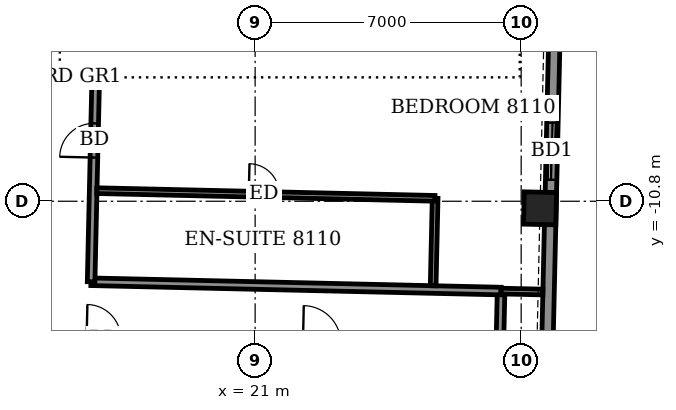
"""IFC4 building model, lengths in metres.
Left out: names, types, materials, properties, quantities, classifications, styles, units other than length and angle.
Written with IfcOpenShell. Run it as: python <this file> out.ifc"""

import sys

from ifc_helpers import new_model, si_unit, direction, frame, frame_2d, origin, origin_2d, place, context, subcontext, project, spatial, rectangle, extrude, element, fill, save


model = new_model("IFC4")
c1 = context("Model", 3, precision=1e-05, world=origin(), true_north=direction((0.0, 1.0)))
c2 = subcontext(c1, "Body", "Model", "MODEL_VIEW")
j1 = project(units=[si_unit("LENGTHUNIT", "METRE"), si_unit("PLANEANGLEUNIT", "RADIAN")], contexts=[c1])
p1 = place(None, origin())
s1 = spatial("IfcSite", under=j1, at=p1, CompositionType="ELEMENT")
p2 = place(p1, origin())
s2 = spatial("IfcBuilding", under=s1, at=p2, CompositionType="ELEMENT")
p3 = place(p2, frame((0.0, 0.0, 316.9)))
s3 = spatial("IfcBuildingStorey", under=s2, at=p3, CompositionType="ELEMENT", Elevation=316.9)
p4 = place(p3, frame((28.496, -10.986, -0.55), z_axis=(0.0, 0.0, 1.0), x_axis=(0.022660985877, 0.999743206888, 0.0)))
e1 = element("IfcColumn", 1, at=p4, inside=s3, PredefinedType="COLUMN", context=c2, shape_type="SweptSolid", body=[
    extrude(rectangle(XDim=0.85, YDim=0.85, at=origin_2d()), origin(), (0.0, 0.0, 1.0), 3.6),
])
p5 = place(p3, frame((28.544, -20.99, 0.0), z_axis=(0.0, 0.0, 1.0), x_axis=(0.02271281838, 0.999742030667, 0.0)))
e2 = element("IfcWall", 2, at=p5, inside=s3, PredefinedType="SOLIDWALL", context=c2, shape_type="SweptSolid", body=[
    extrude(rectangle(XDim=15.5, YDim=0.3, at=frame_2d((7.75, 0.0))), origin(), (0.0, 0.0, 1.0), 2.55),
])
p6 = place(p5, frame((1.88, 0.0, 0.0)))
e3 = element("IfcOpeningElement", 3, at=p6, cuts=e2, PredefinedType="OPENING", context=c2, shape_type="SweptSolid", body=[
    extrude(rectangle(XDim=1.5, YDim=2.4, at=frame_2d((0.75, 1.2))), frame((0.0, 0.16, 0.0), z_axis=(0.0, -1.0, 0.0), x_axis=(1.0, 0.0, 0.0)), (0.0, 0.0, 1.0), 0.32),
])
p7 = place(p5, frame((10.758, 0.0, 0.0)))
e4 = element("IfcOpeningElement", 4, at=p7, cuts=e2, PredefinedType="OPENING", context=c2, shape_type="SweptSolid", body=[
    extrude(rectangle(XDim=1.5, YDim=2.4, at=frame_2d((0.75, 1.2))), frame((0.0, 0.16, 0.0), z_axis=(0.0, -1.0, 0.0), x_axis=(1.0, 0.0, 0.0)), (0.0, 0.0, 1.0), 0.32),
])
p8 = place(p3, frame((-31.347, -13.329, 0.0), z_axis=(0.0, 0.0, 1.0), x_axis=(0.999742613079, -0.022687168058, 0.0)))
e5 = element("IfcWall", 5, at=p8, inside=s3, PredefinedType="PARTITIONING", context=c2, shape_type="SweptSolid", body=[
    extrude(rectangle(XDim=58.799, YDim=0.2, at=frame_2d((29.399, 0.0))), origin(), (0.0, 0.0, 1.0), 3.05),
])
p9 = place(p8, frame((2.075, 0.0, 0.0)))
e6 = element("IfcOpeningElement", 6, at=p9, cuts=e5, PredefinedType="OPENING", context=c2, shape_type="SweptSolid", body=[
    extrude(rectangle(XDim=1.0, YDim=2.1, at=frame_2d((0.5, 1.05))), frame((0.0, 0.11, 0.0), z_axis=(0.0, -1.0, 0.0), x_axis=(1.0, 0.0, 0.0)), (0.0, 0.0, 1.0), 0.22),
])
p10 = place(p8, frame((7.5, 0.0, 0.0)))
e7 = element("IfcOpeningElement", 7, at=p10, cuts=e5, PredefinedType="OPENING", context=c2, shape_type="SweptSolid", body=[
    extrude(rectangle(XDim=0.9, YDim=2.1, at=frame_2d((0.45, 1.05))), frame((0.0, 0.11, 0.0), z_axis=(0.0, -1.0, 0.0), x_axis=(1.0, 0.0, 0.0)), (0.0, 0.0, 1.0), 0.22),
])
p11 = place(p8, frame((12.35, 0.0, 0.0)))
e8 = element("IfcOpeningElement", 8, at=p11, cuts=e5, PredefinedType="OPENING", context=c2, shape_type="SweptSolid", body=[
    extrude(rectangle(XDim=0.9, YDim=2.1, at=frame_2d((0.45, 1.05))), frame((0.0, 0.11, 0.0), z_axis=(0.0, -1.0, 0.0), x_axis=(1.0, 0.0, 0.0)), (0.0, 0.0, 1.0), 0.22),
])
p12 = place(p8, frame((14.425, 0.0, 0.0)))
e9 = element("IfcOpeningElement", 9, at=p12, cuts=e5, PredefinedType="OPENING", context=c2, shape_type="SweptSolid", body=[
    extrude(rectangle(XDim=0.9, YDim=2.1, at=frame_2d((0.45, 1.05))), frame((0.0, 0.11, 0.0), z_axis=(0.0, -1.0, 0.0), x_axis=(1.0, 0.0, 0.0)), (0.0, 0.0, 1.0), 0.22),
])
p13 = place(p8, frame((21.225, 0.0, 0.0)))
e10 = element("IfcOpeningElement", 10, at=p13, cuts=e5, PredefinedType="OPENING", context=c2, shape_type="SweptSolid", body=[
    extrude(rectangle(XDim=0.9, YDim=2.1, at=frame_2d((0.45, 1.05))), frame((0.0, 0.11, 0.0), z_axis=(0.0, -1.0, 0.0), x_axis=(1.0, 0.0, 0.0)), (0.0, 0.0, 1.0), 0.22),
])
p14 = place(p8, frame((23.25, 0.0, 0.0)))
e11 = element("IfcOpeningElement", 11, at=p14, cuts=e5, PredefinedType="OPENING", context=c2, shape_type="SweptSolid", body=[
    extrude(rectangle(XDim=0.9, YDim=2.1, at=frame_2d((0.45, 1.05))), frame((0.0, 0.11, 0.0), z_axis=(0.0, -1.0, 0.0), x_axis=(1.0, 0.0, 0.0)), (0.0, 0.0, 1.0), 0.22),
])
p15 = place(p8, frame((30.025, 0.0, 0.0)))
e12 = element("IfcOpeningElement", 12, at=p15, cuts=e5, PredefinedType="OPENING", context=c2, shape_type="SweptSolid", body=[
    extrude(rectangle(XDim=0.9, YDim=2.1, at=frame_2d((0.45, 1.05))), frame((0.0, 0.11, 0.0), z_axis=(0.0, -1.0, 0.0), x_axis=(1.0, 0.0, 0.0)), (0.0, 0.0, 1.0), 0.22),
])
p16 = place(p8, frame((32.025, 0.0, 0.0)))
e13 = element("IfcOpeningElement", 13, at=p16, cuts=e5, PredefinedType="OPENING", context=c2, shape_type="SweptSolid", body=[
    extrude(rectangle(XDim=0.9, YDim=2.1, at=frame_2d((0.45, 1.05))), frame((0.0, 0.11, 0.0), z_axis=(0.0, -1.0, 0.0), x_axis=(1.0, 0.0, 0.0)), (0.0, 0.0, 1.0), 0.22),
])
p17 = place(p8, frame((38.95, 0.0, 0.0)))
e14 = element("IfcOpeningElement", 14, at=p17, cuts=e5, PredefinedType="OPENING", context=c2, shape_type="SweptSolid", body=[
    extrude(rectangle(XDim=0.9, YDim=2.1, at=frame_2d((0.45, 1.05))), frame((0.0, 0.11, 0.0), z_axis=(0.0, -1.0, 0.0), x_axis=(1.0, 0.0, 0.0)), (0.0, 0.0, 1.0), 0.22),
])
p18 = place(p8, frame((41.05, 0.0, 0.0)))
e15 = element("IfcOpeningElement", 15, at=p18, cuts=e5, PredefinedType="OPENING", context=c2, shape_type="SweptSolid", body=[
    extrude(rectangle(XDim=0.9, YDim=2.1, at=frame_2d((0.45, 1.05))), frame((0.0, 0.11, 0.0), z_axis=(0.0, -1.0, 0.0), x_axis=(1.0, 0.0, 0.0)), (0.0, 0.0, 1.0), 0.22),
])
p19 = place(p8, frame((47.925, 0.0, 0.0)))
e16 = element("IfcOpeningElement", 16, at=p19, cuts=e5, PredefinedType="OPENING", context=c2, shape_type="SweptSolid", body=[
    extrude(rectangle(XDim=0.9, YDim=2.1, at=frame_2d((0.45, 1.05))), frame((0.0, 0.11, 0.0), z_axis=(0.0, -1.0, 0.0), x_axis=(1.0, 0.0, 0.0)), (0.0, 0.0, 1.0), 0.22),
])
p20 = place(p8, frame((53.618, 0.0, 0.0)))
e17 = element("IfcOpeningElement", 17, at=p20, cuts=e5, PredefinedType="OPENING", context=c2, shape_type="SweptSolid", body=[
    extrude(rectangle(XDim=1.0, YDim=2.1, at=frame_2d((0.5, 1.05))), frame((0.0, 0.11, 0.0), z_axis=(0.0, -1.0, 0.0), x_axis=(1.0, 0.0, 0.0)), (0.0, 0.0, 1.0), 0.22),
])
p21 = place(p3, frame((27.437, -14.663, 0.0), z_axis=(0.0, 0.0, 1.0), x_axis=(0.022617910375, 0.999744182344, 0.0)))
e18 = element("IfcWall", 18, at=p21, inside=s3, PredefinedType="PARTITIONING", context=c2, shape_type="SweptSolid", body=[
    extrude(rectangle(XDim=1.5, YDim=0.2, at=frame_2d((0.75, 0.0))), origin(), (0.0, 0.0, 1.0), 3.05),
])
p22 = place(p3, frame((16.679, -12.918, 0.0), z_axis=(0.0, 0.0, 1.0), x_axis=(0.999742162372, -0.022707020428, 0.0)))
e19 = element("IfcWall", 19, at=p22, inside=s3, PredefinedType="PARTITIONING", context=c2, shape_type="SweptSolid", body=[
    extrude(rectangle(XDim=10.795, YDim=0.2, at=frame_2d((5.397, 0.0))), origin(), (0.0, 0.0, 1.0), 3.05),
])
p23 = place(p3, frame((16.684, -12.919, 0.0), z_axis=(0.0, 0.0, 1.0), x_axis=(0.022667483124, 0.999743059595, 0.0)))
e20 = element("IfcWall", 20, at=p23, inside=s3, PredefinedType="PARTITIONING", context=c2, shape_type="SweptSolid", body=[
    extrude(rectangle(XDim=5.245, YDim=0.2, at=frame_2d((2.623, 0.0))), origin(), (0.0, 0.0, 1.0), 3.05),
])
p24 = place(p23, frame((3.27, 0.0, 0.0)))
e21 = element("IfcOpeningElement", 21, at=p24, cuts=e20, PredefinedType="OPENING", context=c2, shape_type="SweptSolid", body=[
    extrude(rectangle(XDim=0.9, YDim=2.1, at=frame_2d((0.45, 1.05))), frame((0.0, 0.11, 0.0), z_axis=(0.0, -1.0, 0.0), x_axis=(1.0, 0.0, 0.0)), (0.0, 0.0, 1.0), 0.22),
])
p25 = place(p3, frame((25.684, -13.023, 0.0), z_axis=(0.0, 0.0, 1.0), x_axis=(0.022603288534, 0.999744513037, 0.0)))
e22 = element("IfcWall", 22, at=p25, inside=s3, PredefinedType="PARTITIONING", context=c2, shape_type="SweptSolid", body=[
    extrude(rectangle(XDim=2.301, YDim=0.15, at=frame_2d((1.15, 0.0))), origin(), (0.0, 0.0, 1.0), 3.05),
])
p26 = place(p3, frame((27.467, -13.163, 0.0), z_axis=(0.0, 0.0, 1.0), x_axis=(0.999745701647, -0.022550654924, 0.0)))
e23 = element("IfcWall", 23, at=p26, inside=s3, PredefinedType="PARTITIONING", context=c2, shape_type="SweptSolid", body=[
    extrude(rectangle(XDim=1.104, YDim=0.15, at=frame_2d((0.552, 0.0))), origin(), (0.0, 0.0, 1.0), 2.55),
])
p27 = place(p3, frame((16.834, -10.521, 0.0), z_axis=(0.0, 0.0, 1.0), x_axis=(0.999742599783, -0.022687753966, 0.0)))
e24 = element("IfcWall", 24, at=p27, inside=s3, PredefinedType="PARTITIONING", context=c2, shape_type="SweptSolid", body=[
    extrude(rectangle(XDim=8.899, YDim=0.15, at=frame_2d((4.45, 0.0))), origin(), (0.0, 0.0, 1.0), 3.05),
])
p28 = place(p27, frame((4.0, 0.0, 0.0)))
e25 = element("IfcOpeningElement", 25, at=p28, cuts=e24, PredefinedType="OPENING", context=c2, shape_type="SweptSolid", body=[
    extrude(rectangle(XDim=0.8, YDim=2.1, at=frame_2d((0.4, 1.05))), frame((0.0, 0.085, 0.0), z_axis=(0.0, -1.0, 0.0), x_axis=(1.0, 0.0, 0.0)), (0.0, 0.0, 1.0), 0.17),
])
p29 = place(p7, origin())
e26 = element("IfcDoor", 26, at=p29, inside=s3, OperationType="SLIDING_TO_LEFT", PredefinedType="DOOR", context=c2, shape_type="SweptSolid", body=[
    extrude(rectangle(XDim=1.5, YDim=2.4, at=frame_2d((0.75, 1.2))), frame((0.0, 0.025, 0.0), z_axis=(0.0, -1.0, 0.0), x_axis=(1.0, 0.0, 0.0)), (0.0, 0.0, 1.0), 0.05),
])
fill(e4, e26)
p30 = place(p24, origin())
e27 = element("IfcDoor", 27, at=p30, inside=s3, OperationType="SINGLE_SWING_RIGHT", PredefinedType="DOOR", context=c2, shape_type="SweptSolid", body=[
    extrude(rectangle(XDim=0.9, YDim=2.1, at=frame_2d((0.45, 1.05))), frame((0.0, 0.025, 0.0), z_axis=(0.0, -1.0, 0.0), x_axis=(1.0, 0.0, 0.0)), (0.0, 0.0, 1.0), 0.05),
])
fill(e21, e27)
p31 = place(p28, origin())
e28 = element("IfcDoor", 28, at=p31, inside=s3, OperationType="SINGLE_SWING_RIGHT", PredefinedType="DOOR", context=c2, shape_type="SweptSolid", body=[
    extrude(rectangle(XDim=0.8, YDim=2.1, at=frame_2d((0.4, 1.05))), frame((0.0, 0.025, 0.0), z_axis=(0.0, -1.0, 0.0), x_axis=(1.0, 0.0, 0.0)), (0.0, 0.0, 1.0), 0.05),
])
fill(e25, e28)
save(model, sys.argv[1])
